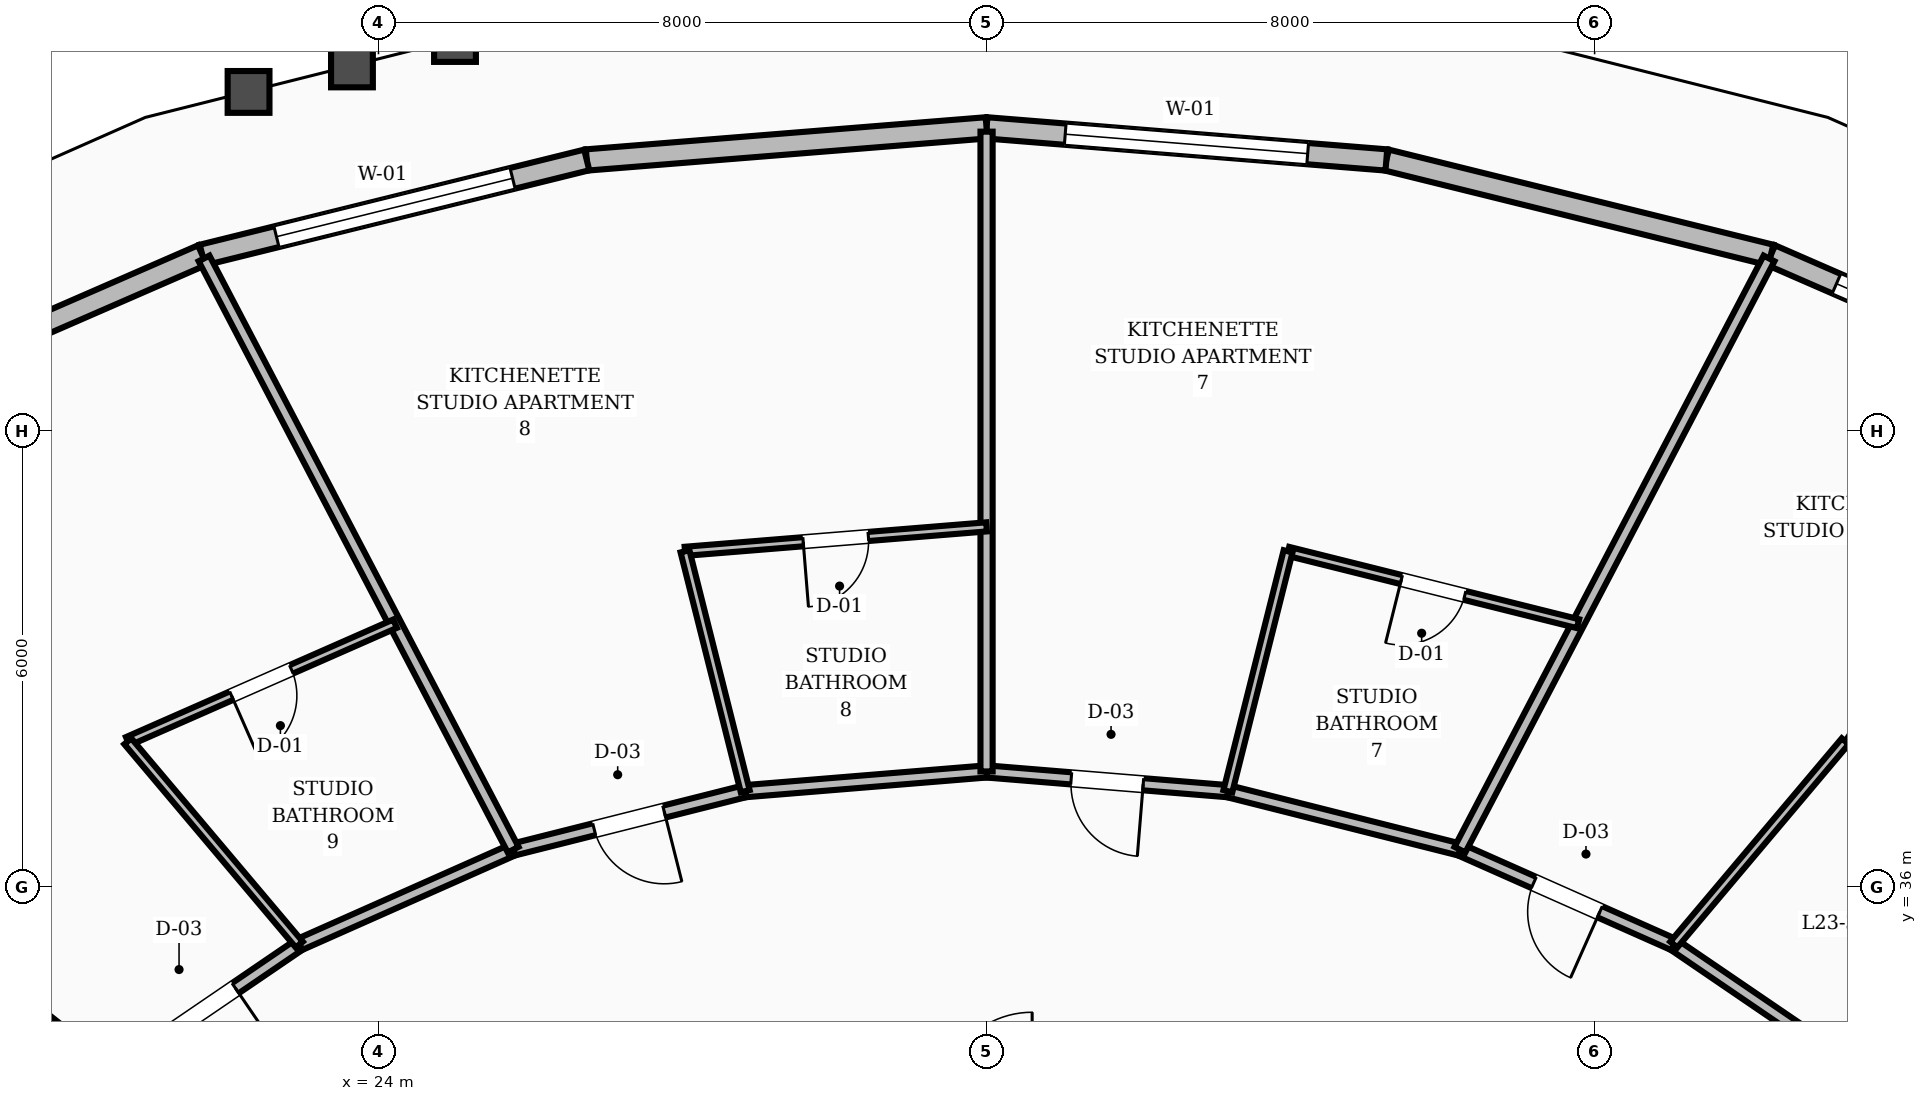
"""IFC4 building model, lengths in metres.
Left out: names, types, materials, properties, quantities, classifications, styles, units other than length and angle.
Written with IfcOpenShell. Run it as: python <this file> out.ifc"""

import sys

from ifc_helpers import new_model, si_unit, direction, frame, frame_2d, origin, place, context, subcontext, project, spatial, rectangle, extrude, element, fill, save


model = new_model("IFC4")
c1 = context("Model", 3, precision=1e-05, world=origin(), true_north=direction((0.0, 1.0)))
c2 = subcontext(c1, "Body", "Model", "MODEL_VIEW")
j1 = project(units=[si_unit("LENGTHUNIT", "METRE"), si_unit("PLANEANGLEUNIT", "RADIAN")], contexts=[c1])
p1 = place(None, origin())
s1 = spatial("IfcSite", under=j1, at=p1, CompositionType="ELEMENT")
p2 = place(p1, origin())
s2 = spatial("IfcBuilding", under=s1, at=p2, CompositionType="ELEMENT")
p3 = place(p2, frame((0.0, 0.0, 91.6)))
s3 = spatial("IfcBuildingStorey", under=s2, at=p3, CompositionType="ELEMENT", Elevation=91.6)
p4 = place(p3, frame((46.979, 42.28, 0.0), z_axis=(0.0, 0.0, 1.0), x_axis=(-0.916706336202, 0.399561626244, 0.0)))
e1 = element("IfcWall", 1, at=p4, inside=s3, PredefinedType="STANDARD", context=c2, shape_type="SweptSolid", body=[
    extrude(rectangle(XDim=5.085, YDim=0.28, at=frame_2d((2.542, 0.0))), origin(), (0.0, 0.0, 1.0), 2.71),
])
p5 = place(p4, frame((0.942, 0.0, 0.8)))
e2 = element("IfcOpeningElement", 2, at=p5, cuts=e1, PredefinedType="OPENING", context=c2, shape_type="SweptSolid", body=[
    extrude(rectangle(XDim=3.2, YDim=1.65, at=frame_2d((1.6, 0.825))), frame((0.0, 0.15, 0.0), z_axis=(0.0, -1.0, 0.0), x_axis=(1.0, 0.0, 0.0)), (0.0, 0.0, 1.0), 0.3),
])
p6 = place(p3, frame((42.318, 44.312, 0.0), z_axis=(0.0, 0.0, 1.0), x_axis=(-0.970745887498, 0.240109187466, 0.0)))
e3 = element("IfcWall", 3, at=p6, inside=s3, PredefinedType="STANDARD", context=c2, shape_type="SweptSolid", body=[
    extrude(rectangle(XDim=5.21, YDim=0.28, at=frame_2d((2.605, 0.0))), origin(), (0.0, 0.0, 1.0), 2.71),
])
p7 = place(p3, frame((37.26, 45.562, 0.0), z_axis=(0.0, 0.0, 1.0), x_axis=(-0.996788005548, 0.080085404391, 0.0)))
e4 = element("IfcWall", 4, at=p7, inside=s3, PredefinedType="STANDARD", context=c2, shape_type="SweptSolid", body=[
    extrude(rectangle(XDim=5.277, YDim=0.28, at=frame_2d((2.638, 0.0))), origin(), (0.0, 0.0, 1.0), 2.71),
])
p8 = place(p7, frame((1.038, 0.0, 0.8)))
e5 = element("IfcOpeningElement", 5, at=p8, cuts=e4, PredefinedType="OPENING", context=c2, shape_type="SweptSolid", body=[
    extrude(rectangle(XDim=3.2, YDim=1.65, at=frame_2d((1.6, 0.825))), frame((0.0, 0.15, 0.0), z_axis=(0.0, -1.0, 0.0), x_axis=(1.0, 0.0, 0.0)), (0.0, 0.0, 1.0), 0.3),
])
p9 = place(p3, frame((32.0, 45.985, 0.0), z_axis=(0.0, 0.0, 1.0), x_axis=(-0.996788005548, -0.080085404391, 0.0)))
e6 = element("IfcWall", 6, at=p9, inside=s3, PredefinedType="STANDARD", context=c2, shape_type="SweptSolid", body=[
    extrude(rectangle(XDim=5.277, YDim=0.28, at=frame_2d((2.638, 0.0))), origin(), (0.0, 0.0, 1.0), 2.71),
])
p10 = place(p3, frame((26.74, 45.562, 0.0), z_axis=(0.0, 0.0, 1.0), x_axis=(-0.970745887498, -0.240109187466, 0.0)))
e7 = element("IfcWall", 7, at=p10, inside=s3, PredefinedType="STANDARD", context=c2, shape_type="SweptSolid", body=[
    extrude(rectangle(XDim=5.21, YDim=0.28, at=frame_2d((2.605, 0.0))), origin(), (0.0, 0.0, 1.0), 2.71),
])
p11 = place(p10, frame((1.005, 0.0, 0.8)))
e8 = element("IfcOpeningElement", 8, at=p11, cuts=e7, PredefinedType="OPENING", context=c2, shape_type="SweptSolid", body=[
    extrude(rectangle(XDim=3.2, YDim=1.65, at=frame_2d((1.6, 0.825))), frame((0.0, 0.15, 0.0), z_axis=(0.0, -1.0, 0.0), x_axis=(1.0, 0.0, 0.0)), (0.0, 0.0, 1.0), 0.3),
])
p12 = place(p3, frame((21.682, 44.312, 0.0), z_axis=(0.0, 0.0, 1.0), x_axis=(-0.916706336202, -0.399561626244, 0.0)))
e9 = element("IfcWall", 9, at=p12, inside=s3, PredefinedType="STANDARD", context=c2, shape_type="SweptSolid", body=[
    extrude(rectangle(XDim=5.085, YDim=0.28, at=frame_2d((2.542, 0.0))), origin(), (0.0, 0.0, 1.0), 2.71),
])
p13 = place(p3, frame((43.508, 33.559, 0.0), z_axis=(0.0, 0.0, 1.0), x_axis=(-0.826293096206, 0.56324037423, 0.0)))
e10 = element("IfcWall", 10, at=p13, inside=s3, PredefinedType="SOLIDWALL", context=c2, shape_type="SweptSolid", body=[
    extrude(rectangle(XDim=2.985, YDim=0.16, at=frame_2d((1.492, 0.0))), origin(), (0.0, 0.0, 1.0), 2.71),
])
p14 = place(p3, frame((41.041, 35.24, 0.0), z_axis=(0.0, 0.0, 1.0), x_axis=(-0.913952123493, 0.405822024984, 0.0)))
e11 = element("IfcWall", 11, at=p14, inside=s3, PredefinedType="SOLIDWALL", context=c2, shape_type="SweptSolid", body=[
    extrude(rectangle(XDim=3.078, YDim=0.16, at=frame_2d((1.539, 0.0))), origin(), (0.0, 0.0, 1.0), 2.71),
])
p15 = place(p14, frame((1.064, 0.0, 0.0)))
e12 = element("IfcOpeningElement", 12, at=p15, cuts=e11, PredefinedType="OPENING", context=c2, shape_type="SweptSolid", body=[
    extrude(rectangle(XDim=0.95, YDim=2.1, at=frame_2d((0.475, 1.05))), frame((0.0, 0.09, 0.0), z_axis=(0.0, -1.0, 0.0), x_axis=(1.0, 0.0, 0.0)), (0.0, 0.0, 1.0), 0.18),
])
p16 = place(p3, frame((38.228, 36.489, 0.0), z_axis=(0.0, 0.0, 1.0), x_axis=(-0.969689238064, 0.244341526521, 0.0)))
e13 = element("IfcWall", 13, at=p16, inside=s3, PredefinedType="SOLIDWALL", context=c2, shape_type="SweptSolid", body=[
    extrude(rectangle(XDim=3.148, YDim=0.16, at=frame_2d((1.574, 0.0))), origin(), (0.0, 0.0, 1.0), 2.71),
])
p17 = place(p3, frame((35.175, 37.258, 0.0), z_axis=(0.0, 0.0, 1.0), x_axis=(-0.996669377538, 0.081548463373, 0.0)))
e14 = element("IfcWall", 14, at=p17, inside=s3, PredefinedType="SOLIDWALL", context=c2, shape_type="SweptSolid", body=[
    extrude(rectangle(XDim=3.185, YDim=0.16, at=frame_2d((1.593, 0.0))), origin(), (0.0, 0.0, 1.0), 2.71),
])
p18 = place(p17, frame((1.118, 0.0, 0.0)))
e15 = element("IfcOpeningElement", 15, at=p18, cuts=e14, PredefinedType="OPENING", context=c2, shape_type="SweptSolid", body=[
    extrude(rectangle(XDim=0.95, YDim=2.1, at=frame_2d((0.475, 1.05))), frame((0.0, 0.09, 0.0), z_axis=(0.0, -1.0, 0.0), x_axis=(1.0, 0.0, 0.0)), (0.0, 0.0, 1.0), 0.18),
])
p19 = place(p3, frame((32.0, 37.518, 0.0), z_axis=(0.0, 0.0, 1.0), x_axis=(-0.996669377538, -0.081548463373, 0.0)))
e16 = element("IfcWall", 16, at=p19, inside=s3, PredefinedType="SOLIDWALL", context=c2, shape_type="SweptSolid", body=[
    extrude(rectangle(XDim=3.185, YDim=0.16, at=frame_2d((1.593, 0.0))), origin(), (0.0, 0.0, 1.0), 2.71),
])
p20 = place(p3, frame((28.825, 37.258, 0.0), z_axis=(0.0, 0.0, 1.0), x_axis=(-0.969689238064, -0.244341526521, 0.0)))
e17 = element("IfcWall", 17, at=p20, inside=s3, PredefinedType="SOLIDWALL", context=c2, shape_type="SweptSolid", body=[
    extrude(rectangle(XDim=3.148, YDim=0.16, at=frame_2d((1.574, 0.0))), origin(), (0.0, 0.0, 1.0), 2.71),
])
p21 = place(p20, frame((1.099, 0.0, 0.0)))
e18 = element("IfcOpeningElement", 18, at=p21, cuts=e17, PredefinedType="OPENING", context=c2, shape_type="SweptSolid", body=[
    extrude(rectangle(XDim=0.95, YDim=2.1, at=frame_2d((0.475, 1.05))), frame((0.0, 0.09, 0.0), z_axis=(0.0, -1.0, 0.0), x_axis=(1.0, 0.0, 0.0)), (0.0, 0.0, 1.0), 0.18),
])
p22 = place(p3, frame((25.772, 36.489, 0.0), z_axis=(0.0, 0.0, 1.0), x_axis=(-0.913952123493, -0.405822024984, 0.0)))
e19 = element("IfcWall", 19, at=p22, inside=s3, PredefinedType="SOLIDWALL", context=c2, shape_type="SweptSolid", body=[
    extrude(rectangle(XDim=3.078, YDim=0.16, at=frame_2d((1.539, 0.0))), origin(), (0.0, 0.0, 1.0), 2.71),
])
p23 = place(p3, frame((22.959, 35.24, 0.0), z_axis=(0.0, 0.0, 1.0), x_axis=(-0.826293096206, -0.56324037423, 0.0)))
e20 = element("IfcWall", 20, at=p23, inside=s3, PredefinedType="SOLIDWALL", context=c2, shape_type="SweptSolid", body=[
    extrude(rectangle(XDim=2.985, YDim=0.16, at=frame_2d((1.492, 0.0))), origin(), (0.0, 0.0, 1.0), 2.71),
])
p24 = place(p23, frame((1.017, 0.0, 0.0)))
e21 = element("IfcOpeningElement", 21, at=p24, cuts=e20, PredefinedType="OPENING", context=c2, shape_type="SweptSolid", body=[
    extrude(rectangle(XDim=0.95, YDim=2.1, at=frame_2d((0.475, 1.05))), frame((0.0, 0.09, 0.0), z_axis=(0.0, -1.0, 0.0), x_axis=(1.0, 0.0, 0.0)), (0.0, 0.0, 1.0), 0.18),
])
p25 = place(p3, frame((46.379, 35.834, 0.0), z_axis=(0.0, 0.0, 1.0), x_axis=(-0.828691848629, 0.559705118805, 0.0)))
e22 = element("IfcWall", 22, at=p25, inside=s3, PredefinedType="PARTITIONING", context=c2, shape_type="SweptSolid", body=[
    extrude(rectangle(XDim=3.719, YDim=0.12, at=frame_2d((1.859, 0.0))), origin(), (0.0, 0.0, 1.0), 2.71),
])
p26 = place(p25, frame((1.429, 0.0, 0.0)))
e23 = element("IfcOpeningElement", 23, at=p26, cuts=e22, PredefinedType="OPENING", context=c2, shape_type="SweptSolid", body=[
    extrude(rectangle(XDim=0.86, YDim=2.1, at=frame_2d((0.43, 1.05))), frame((0.0, 0.07, 0.0), z_axis=(0.0, -1.0, 0.0), x_axis=(1.0, 0.0, 0.0)), (0.0, 0.0, 1.0), 0.14),
])
p27 = place(p3, frame((41.041, 35.24, 0.0), z_axis=(0.0, 0.0, 1.0), x_axis=(0.644715569152, 0.764422549964, 0.0)))
e24 = element("IfcWall", 24, at=p27, inside=s3, PredefinedType="PARTITIONING", context=c2, shape_type="SweptSolid", body=[
    extrude(rectangle(XDim=3.5, YDim=0.12, at=frame_2d((1.75, 0.0))), origin(), (0.0, 0.0, 1.0), 2.71),
])
p28 = place(p3, frame((38.228, 36.489, 0.0), z_axis=(0.0, 0.0, 1.0), x_axis=(0.463329180803, 0.886186250297, 0.0)))
e25 = element("IfcWall", 25, at=p28, inside=s3, PredefinedType="SOLIDWALL", context=c2, shape_type="SweptSolid", body=[
    extrude(rectangle(XDim=8.777, YDim=0.16, at=frame_2d((4.389, 0.0))), origin(), (0.0, 0.0, 1.0), 2.71),
])
p29 = place(p3, frame((39.782, 39.462, 0.0), z_axis=(0.0, 0.0, 1.0), x_axis=(-0.970233747501, 0.242170343376, 0.0)))
e26 = element("IfcWall", 26, at=p29, inside=s3, PredefinedType="PARTITIONING", context=c2, shape_type="SweptSolid", body=[
    extrude(rectangle(XDim=3.932, YDim=0.12, at=frame_2d((1.966, 0.0))), origin(), (0.0, 0.0, 1.0), 2.71),
])
p30 = place(p29, frame((1.536, 0.0, 0.0)))
e27 = element("IfcOpeningElement", 27, at=p30, cuts=e26, PredefinedType="OPENING", context=c2, shape_type="SweptSolid", body=[
    extrude(rectangle(XDim=0.86, YDim=2.1, at=frame_2d((0.43, 1.05))), frame((0.0, 0.07, 0.0), z_axis=(0.0, -1.0, 0.0), x_axis=(1.0, 0.0, 0.0)), (0.0, 0.0, 1.0), 0.14),
])
p31 = place(p3, frame((35.175, 37.258, 0.0), z_axis=(0.0, 0.0, 1.0), x_axis=(0.243577205712, 0.969881510731, 0.0)))
e28 = element("IfcWall", 28, at=p31, inside=s3, PredefinedType="PARTITIONING", context=c2, shape_type="SweptSolid", body=[
    extrude(rectangle(XDim=3.253, YDim=0.12, at=frame_2d((1.627, 0.0))), origin(), (0.0, 0.0, 1.0), 2.71),
])
p32 = place(p3, frame((32.0, 37.518, 0.0), z_axis=(0.0, 0.0, 1.0), x_axis=(0.0, 1.0, 0.0)))
e29 = element("IfcWall", 29, at=p32, inside=s3, PredefinedType="SOLIDWALL", context=c2, shape_type="SweptSolid", body=[
    extrude(rectangle(XDim=8.417, YDim=0.16, at=frame_2d((4.208, 0.0))), origin(), (0.0, 0.0, 1.0), 2.71),
])
p33 = place(p3, frame((32.0, 40.736, 0.0), z_axis=(0.0, 0.0, 1.0), x_axis=(-0.996726911208, -0.080842219629, 0.0)))
e30 = element("IfcWall", 30, at=p33, inside=s3, PredefinedType="PARTITIONING", context=c2, shape_type="SweptSolid", body=[
    extrude(rectangle(XDim=3.98, YDim=0.12, at=frame_2d((1.99, 0.0))), origin(), (0.0, 0.0, 1.0), 2.71),
])
p34 = place(p33, frame((1.56, 0.0, 0.0)))
e31 = element("IfcOpeningElement", 31, at=p34, cuts=e30, PredefinedType="OPENING", context=c2, shape_type="SweptSolid", body=[
    extrude(rectangle(XDim=0.86, YDim=2.1, at=frame_2d((0.43, 1.05))), frame((0.0, 0.07, 0.0), z_axis=(0.0, -1.0, 0.0), x_axis=(1.0, 0.0, 0.0)), (0.0, 0.0, 1.0), 0.14),
])
p35 = place(p3, frame((28.825, 37.258, 0.0), z_axis=(0.0, 0.0, 1.0), x_axis=(-0.243577205712, 0.969881510731, 0.0)))
e32 = element("IfcWall", 32, at=p35, inside=s3, PredefinedType="PARTITIONING", context=c2, shape_type="SweptSolid", body=[
    extrude(rectangle(XDim=3.253, YDim=0.12, at=frame_2d((1.627, 0.0))), origin(), (0.0, 0.0, 1.0), 2.71),
])
p36 = place(p3, frame((25.772, 36.489, 0.0), z_axis=(0.0, 0.0, 1.0), x_axis=(-0.463329180803, 0.886186250297, 0.0)))
e33 = element("IfcWall", 33, at=p36, inside=s3, PredefinedType="SOLIDWALL", context=c2, shape_type="SweptSolid", body=[
    extrude(rectangle(XDim=8.777, YDim=0.16, at=frame_2d((4.389, 0.0))), origin(), (0.0, 0.0, 1.0), 2.71),
])
p37 = place(p3, frame((24.218, 39.462, 0.0), z_axis=(0.0, 0.0, 1.0), x_axis=(-0.915338463075, -0.402685358582, 0.0)))
e34 = element("IfcWall", 34, at=p37, inside=s3, PredefinedType="PARTITIONING", context=c2, shape_type="SweptSolid", body=[
    extrude(rectangle(XDim=3.841, YDim=0.12, at=frame_2d((1.92, 0.0))), origin(), (0.0, 0.0, 1.0), 2.71),
])
p38 = place(p37, frame((1.49, 0.0, 0.0)))
e35 = element("IfcOpeningElement", 35, at=p38, cuts=e34, PredefinedType="OPENING", context=c2, shape_type="SweptSolid", body=[
    extrude(rectangle(XDim=0.86, YDim=2.1, at=frame_2d((0.43, 1.05))), frame((0.0, 0.07, 0.0), z_axis=(0.0, -1.0, 0.0), x_axis=(1.0, 0.0, 0.0)), (0.0, 0.0, 1.0), 0.14),
])
p39 = place(p3, frame((22.959, 35.24, 0.0), z_axis=(0.0, 0.0, 1.0), x_axis=(-0.644715569152, 0.764422549964, 0.0)))
e36 = element("IfcWall", 36, at=p39, inside=s3, PredefinedType="PARTITIONING", context=c2, shape_type="SweptSolid", body=[
    extrude(rectangle(XDim=3.5, YDim=0.12, at=frame_2d((1.75, 0.0))), origin(), (0.0, 0.0, 1.0), 2.71),
])
p40 = place(p3, frame((20.492, 33.559, 0.0), z_axis=(0.0, 0.0, 1.0), x_axis=(-0.783820213827, 0.620987819846, 0.0)))
e37 = element("IfcWall", 37, at=p40, inside=s3, PredefinedType="SOLIDWALL", context=c2, shape_type="SweptSolid", body=[
    extrude(rectangle(XDim=9.591, YDim=0.16, at=frame_2d((4.796, 0.0))), origin(), (0.0, 0.0, 1.0), 2.71),
])
p41 = place(p5, origin())
e38 = element("IfcWindow", 38, at=p41, inside=s3, PartitioningType="SINGLE_PANEL", PredefinedType="WINDOW", context=c2, shape_type="SweptSolid", body=[
    extrude(rectangle(XDim=3.2, YDim=1.65, at=frame_2d((1.6, 0.825))), frame((0.0, 0.03, 0.0), z_axis=(0.0, -1.0, 0.0), x_axis=(1.0, 0.0, 0.0)), (0.0, 0.0, 1.0), 0.06),
])
fill(e2, e38)
p42 = place(p8, origin())
e39 = element("IfcWindow", 39, at=p42, inside=s3, PartitioningType="SINGLE_PANEL", PredefinedType="WINDOW", context=c2, shape_type="SweptSolid", body=[
    extrude(rectangle(XDim=3.2, YDim=1.65, at=frame_2d((1.6, 0.825))), frame((0.0, 0.03, 0.0), z_axis=(0.0, -1.0, 0.0), x_axis=(1.0, 0.0, 0.0)), (0.0, 0.0, 1.0), 0.06),
])
fill(e5, e39)
p43 = place(p11, origin())
e40 = element("IfcWindow", 40, at=p43, inside=s3, PartitioningType="SINGLE_PANEL", PredefinedType="WINDOW", context=c2, shape_type="SweptSolid", body=[
    extrude(rectangle(XDim=3.2, YDim=1.65, at=frame_2d((1.6, 0.825))), frame((0.0, 0.03, 0.0), z_axis=(0.0, -1.0, 0.0), x_axis=(1.0, 0.0, 0.0)), (0.0, 0.0, 1.0), 0.06),
])
fill(e8, e40)
p44 = place(p15, origin())
e41 = element("IfcDoor", 41, at=p44, inside=s3, OperationType="SINGLE_SWING_LEFT", PredefinedType="DOOR", context=c2, shape_type="SweptSolid", body=[
    extrude(rectangle(XDim=0.95, YDim=2.1, at=frame_2d((0.475, 1.05))), frame((0.0, 0.025, 0.0), z_axis=(0.0, -1.0, 0.0), x_axis=(1.0, 0.0, 0.0)), (0.0, 0.0, 1.0), 0.05),
])
fill(e12, e41)
p45 = place(p30, origin())
e42 = element("IfcDoor", 42, at=p45, inside=s3, OperationType="SINGLE_SWING_RIGHT", PredefinedType="DOOR", context=c2, shape_type="SweptSolid", body=[
    extrude(rectangle(XDim=0.86, YDim=2.1, at=frame_2d((0.43, 1.05))), frame((0.0, 0.025, 0.0), z_axis=(0.0, -1.0, 0.0), x_axis=(1.0, 0.0, 0.0)), (0.0, 0.0, 1.0), 0.05),
])
fill(e27, e42)
p46 = place(p18, origin())
e43 = element("IfcDoor", 43, at=p46, inside=s3, OperationType="SINGLE_SWING_LEFT", PredefinedType="DOOR", context=c2, shape_type="SweptSolid", body=[
    extrude(rectangle(XDim=0.95, YDim=2.1, at=frame_2d((0.475, 1.05))), frame((0.0, 0.025, 0.0), z_axis=(0.0, -1.0, 0.0), x_axis=(1.0, 0.0, 0.0)), (0.0, 0.0, 1.0), 0.05),
])
fill(e15, e43)
p47 = place(p34, origin())
e44 = element("IfcDoor", 44, at=p47, inside=s3, OperationType="SINGLE_SWING_RIGHT", PredefinedType="DOOR", context=c2, shape_type="SweptSolid", body=[
    extrude(rectangle(XDim=0.86, YDim=2.1, at=frame_2d((0.43, 1.05))), frame((0.0, 0.025, 0.0), z_axis=(0.0, -1.0, 0.0), x_axis=(1.0, 0.0, 0.0)), (0.0, 0.0, 1.0), 0.05),
])
fill(e31, e44)
p48 = place(p21, origin())
e45 = element("IfcDoor", 45, at=p48, inside=s3, OperationType="SINGLE_SWING_LEFT", PredefinedType="DOOR", context=c2, shape_type="SweptSolid", body=[
    extrude(rectangle(XDim=0.95, YDim=2.1, at=frame_2d((0.475, 1.05))), frame((0.0, 0.025, 0.0), z_axis=(0.0, -1.0, 0.0), x_axis=(1.0, 0.0, 0.0)), (0.0, 0.0, 1.0), 0.05),
])
fill(e18, e45)
p49 = place(p38, origin())
e46 = element("IfcDoor", 46, at=p49, inside=s3, OperationType="SINGLE_SWING_RIGHT", PredefinedType="DOOR", context=c2, shape_type="SweptSolid", body=[
    extrude(rectangle(XDim=0.86, YDim=2.1, at=frame_2d((0.43, 1.05))), frame((0.0, 0.025, 0.0), z_axis=(0.0, -1.0, 0.0), x_axis=(1.0, 0.0, 0.0)), (0.0, 0.0, 1.0), 0.05),
])
fill(e35, e46)
p50 = place(p24, origin())
e47 = element("IfcDoor", 47, at=p50, inside=s3, OperationType="SINGLE_SWING_LEFT", PredefinedType="DOOR", context=c2, shape_type="SweptSolid", body=[
    extrude(rectangle(XDim=0.95, YDim=2.1, at=frame_2d((0.475, 1.05))), frame((0.0, 0.025, 0.0), z_axis=(0.0, -1.0, 0.0), x_axis=(1.0, 0.0, 0.0)), (0.0, 0.0, 1.0), 0.05),
])
fill(e21, e47)
save(model, sys.argv[1])
